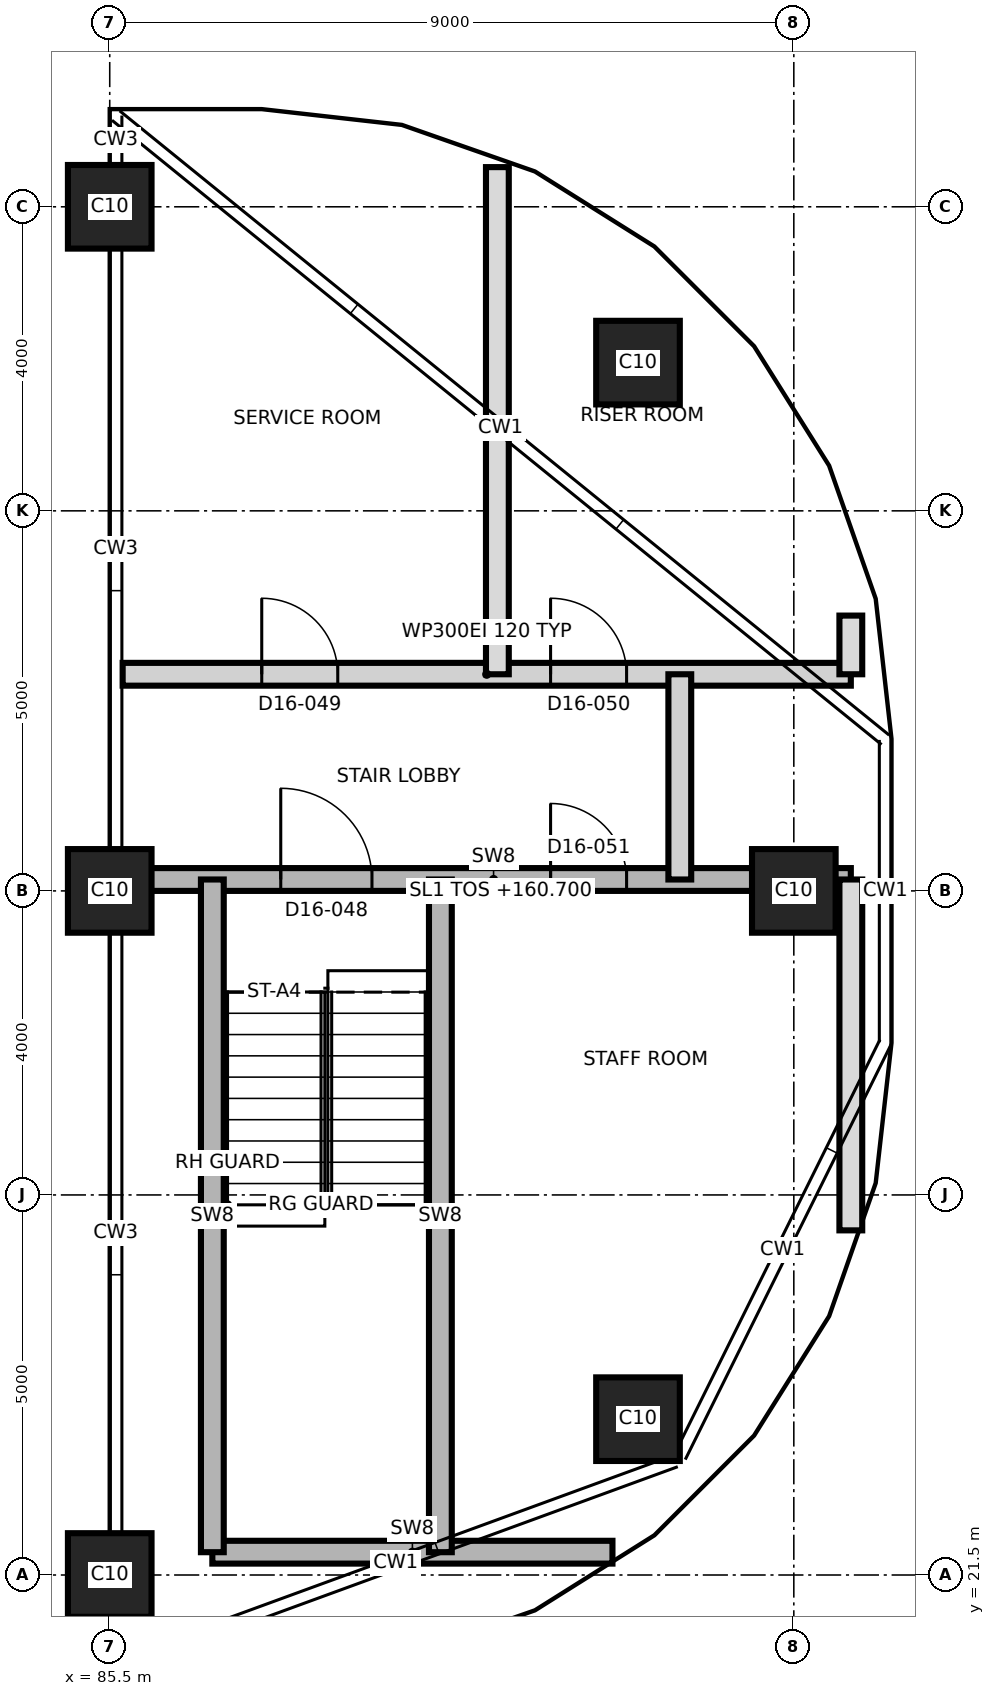
"""IFC4 building model, lengths in metres.
Left out: names, types, materials, properties, quantities, classifications, styles, units other than length and angle.
Written with IfcOpenShell. Run it as: python <this file> out.ifc"""

import sys

from ifc_helpers import new_model, si_unit, direction, frame, frame_2d, origin, origin_2d, place, context, subcontext, project, spatial, rectangle, extrude, element, fill, save


model = new_model("IFC4")
c1 = context("Model", 3, precision=1e-05, world=origin(), true_north=direction((0.0, 1.0)))
c2 = subcontext(c1, "Body", "Model", "MODEL_VIEW")
j1 = project(units=[si_unit("LENGTHUNIT", "METRE"), si_unit("PLANEANGLEUNIT", "RADIAN")], contexts=[c1])
p1 = place(None, origin())
s1 = spatial("IfcSite", under=j1, at=p1, CompositionType="ELEMENT")
p2 = place(p1, origin())
s2 = spatial("IfcBuilding", under=s1, at=p2, CompositionType="ELEMENT")
p3 = place(p2, frame((0.0, 0.0, 160.7)))
s3 = spatial("IfcBuildingStorey", under=s2, at=p3, CompositionType="ELEMENT", Elevation=160.7)
for number, where, z_axis, x_axis in (
    (1, (85.5, 21.5, 0.0), (0.0, 0.0, 1.0), (1.0, 0.0, 0.0)),
    (2, (92.45, 23.55, 0.0), (0.0, 0.0, 1.0), (1.0, 0.0, 0.0)),
    (3, (85.5, 30.5, 0.0), (0.0, 0.0, 1.0), (1.0, 0.0, 0.0)),
    (4, (94.5, 30.5, 0.0), (0.0, 0.0, 1.0), (1.0, 0.0, 0.0)),
    (5, (92.45, 37.45, 0.0), (0.0, 0.0, 1.0), (1.0, 0.0, 0.0)),
    (6, (85.5, 39.5, 0.0), (0.0, 0.0, 1.0), (1.0, 0.0, 0.0)),
):
    element("IfcColumn", number, at=place(p3, frame(where, z_axis=z_axis, x_axis=x_axis)), inside=s3, PredefinedType="COLUMN", context=c2, shape_type="SweptSolid", body=[
        extrude(rectangle(XDim=1.1, YDim=1.1, at=origin_2d()), origin(), (0.0, 0.0, 1.0), 3.7),
    ])
p4 = place(p3, frame((86.85, 21.8, 0.0), z_axis=(0.0, 0.0, 1.0), x_axis=(1.0, 0.0, 0.0)))
e7 = element("IfcWall", 7, at=p4, inside=s3, PredefinedType="SHEAR", context=c2, shape_type="SweptSolid", body=[
    extrude(rectangle(XDim=5.264, YDim=0.3, at=frame_2d((2.632, 0.0))), origin(), (0.0, 0.0, 1.0), 3.4),
])
p5 = place(p3, frame((85.85, 30.65, 0.0), z_axis=(0.0, 0.0, 1.0), x_axis=(1.0, 0.0, 0.0)))
e8 = element("IfcWall", 8, at=p5, inside=s3, PredefinedType="SHEAR", context=c2, shape_type="SweptSolid", body=[
    extrude(rectangle(XDim=9.4, YDim=0.3, at=frame_2d((4.7, 0.0))), origin(), (0.0, 0.0, 1.0), 3.4),
])
p6 = place(p5, frame((1.9, 0.0, 0.0)))
e9 = element("IfcOpeningElement", 9, at=p6, cuts=e8, PredefinedType="OPENING", context=c2, shape_type="SweptSolid", body=[
    extrude(rectangle(XDim=1.2, YDim=2.1, at=frame_2d((0.6, 1.05))), frame((0.0, 0.16, 0.0), z_axis=(0.0, -1.0, 0.0), x_axis=(1.0, 0.0, 0.0)), (0.0, 0.0, 1.0), 0.32),
])
p7 = place(p5, frame((5.45, 0.0, 0.0)))
e10 = element("IfcOpeningElement", 10, at=p7, cuts=e8, PredefinedType="OPENING", context=c2, shape_type="SweptSolid", body=[
    extrude(rectangle(XDim=1.0, YDim=2.1, at=frame_2d((0.5, 1.05))), frame((0.0, 0.16, 0.0), z_axis=(0.0, -1.0, 0.0), x_axis=(1.0, 0.0, 0.0)), (0.0, 0.0, 1.0), 0.32),
])
p8 = place(p3, frame((85.67, 33.35, 0.0), z_axis=(0.0, 0.0, 1.0), x_axis=(1.0, 0.0, 0.0)))
e11 = element("IfcWall", 11, at=p8, inside=s3, PredefinedType="PARTITIONING", context=c2, shape_type="SweptSolid", body=[
    extrude(rectangle(XDim=9.58, YDim=0.3, at=frame_2d((4.79, 0.0))), origin(), (0.0, 0.0, 1.0), 3.4),
])
p9 = place(p8, frame((1.83, 0.0, 0.0)))
e12 = element("IfcOpeningElement", 12, at=p9, cuts=e11, PredefinedType="OPENING", context=c2, shape_type="SweptSolid", body=[
    extrude(rectangle(XDim=1.0, YDim=2.1, at=frame_2d((0.5, 1.05))), frame((0.0, 0.16, 0.0), z_axis=(0.0, -1.0, 0.0), x_axis=(1.0, 0.0, 0.0)), (0.0, 0.0, 1.0), 0.32),
])
p10 = place(p8, frame((5.63, 0.0, 0.0)))
e13 = element("IfcOpeningElement", 13, at=p10, cuts=e11, PredefinedType="OPENING", context=c2, shape_type="SweptSolid", body=[
    extrude(rectangle(XDim=1.0, YDim=2.1, at=frame_2d((0.5, 1.05))), frame((0.0, 0.16, 0.0), z_axis=(0.0, -1.0, 0.0), x_axis=(1.0, 0.0, 0.0)), (0.0, 0.0, 1.0), 0.32),
])
for number, where, z_axis, x_axis in (
    (14, (86.85, 21.8, 0.0), (0.0, 0.0, 1.0), (0.0, 1.0, 0.0)),
    (15, (89.85, 21.8, 0.0), (0.0, 0.0, 1.0), (0.0, 1.0, 0.0)),
):
    element("IfcWall", number, at=place(p3, frame(where, z_axis=z_axis, x_axis=x_axis)), inside=s3, PredefinedType="SHEAR", context=c2, shape_type="SweptSolid", body=[
        extrude(rectangle(XDim=8.85, YDim=0.3, at=frame_2d((4.425, 0.0))), origin(), (0.0, 0.0, 1.0), 3.4),
    ])
p11 = place(p3, frame((90.6, 33.35, 0.0), z_axis=(0.0, 0.0, 1.0), x_axis=(0.0, 1.0, 0.0)))
e16 = element("IfcWall", 16, at=p11, inside=s3, PredefinedType="PARTITIONING", context=c2, shape_type="SweptSolid", body=[
    extrude(rectangle(XDim=6.672, YDim=0.3, at=frame_2d((3.336, 0.0))), origin(), (0.0, 0.0, 1.0), 3.4),
])
p12 = place(p3, frame((93.0, 30.65, 0.0), z_axis=(0.0, 0.0, 1.0), x_axis=(0.0, 1.0, 0.0)))
e17 = element("IfcWall", 17, at=p12, inside=s3, PredefinedType="PARTITIONING", context=c2, shape_type="SweptSolid", body=[
    extrude(rectangle(XDim=2.7, YDim=0.3, at=frame_2d((1.35, 0.0))), origin(), (0.0, 0.0, 1.0), 3.4),
])
p13 = place(p3, frame((95.25, 26.034, 0.0), z_axis=(0.0, 0.0, 1.0), x_axis=(0.0, 1.0, 0.0)))
e18 = element("IfcWall", 18, at=p13, inside=s3, PredefinedType="PARTITIONING", context=c2, shape_type="SweptSolid", body=[
    extrude(rectangle(XDim=4.616, YDim=0.3, at=frame_2d((2.308, 0.0))), origin(), (0.0, 0.0, 1.0), 3.4),
])
p14 = place(p3, frame((95.25, 33.35, 0.0), z_axis=(0.0, 0.0, 1.0), x_axis=(0.0, 1.0, 0.0)))
e19 = element("IfcWall", 19, at=p14, inside=s3, PredefinedType="PARTITIONING", context=c2, shape_type="SweptSolid", body=[
    extrude(rectangle(XDim=0.772, YDim=0.3, at=frame_2d((0.386, 0.0))), origin(), (0.0, 0.0, 1.0), 3.4),
])
p15 = place(p6, origin())
e20 = element("IfcDoor", 20, at=p15, inside=s3, OperationType="SINGLE_SWING_LEFT", PredefinedType="DOOR", context=c2, shape_type="SweptSolid", body=[
    extrude(rectangle(XDim=1.2, YDim=2.1, at=frame_2d((0.6, 1.05))), frame((0.0, 0.025, 0.0), z_axis=(0.0, -1.0, 0.0), x_axis=(1.0, 0.0, 0.0)), (0.0, 0.0, 1.0), 0.05),
])
fill(e9, e20)
p16 = place(p9, origin())
e21 = element("IfcDoor", 21, at=p16, inside=s3, OperationType="SINGLE_SWING_LEFT", PredefinedType="DOOR", context=c2, shape_type="SweptSolid", body=[
    extrude(rectangle(XDim=1.0, YDim=2.1, at=frame_2d((0.5, 1.05))), frame((0.0, 0.025, 0.0), z_axis=(0.0, -1.0, 0.0), x_axis=(1.0, 0.0, 0.0)), (0.0, 0.0, 1.0), 0.05),
])
fill(e12, e21)
p17 = place(p10, origin())
e22 = element("IfcDoor", 22, at=p17, inside=s3, OperationType="SINGLE_SWING_RIGHT", PredefinedType="DOOR", context=c2, shape_type="SweptSolid", body=[
    extrude(rectangle(XDim=1.0, YDim=2.1, at=frame_2d((0.5, 1.05))), frame((0.0, 0.025, 0.0), z_axis=(0.0, -1.0, 0.0), x_axis=(1.0, 0.0, 0.0)), (0.0, 0.0, 1.0), 0.05),
])
fill(e13, e22)
p18 = place(p7, origin())
e23 = element("IfcDoor", 23, at=p18, inside=s3, OperationType="SINGLE_SWING_LEFT", PredefinedType="DOOR", context=c2, shape_type="SweptSolid", body=[
    extrude(rectangle(XDim=1.0, YDim=2.1, at=frame_2d((0.5, 1.05))), frame((0.0, 0.025, 0.0), z_axis=(0.0, -1.0, 0.0), x_axis=(1.0, 0.0, 0.0)), (0.0, 0.0, 1.0), 0.05),
])
fill(e10, e23)
save(model, sys.argv[1])
